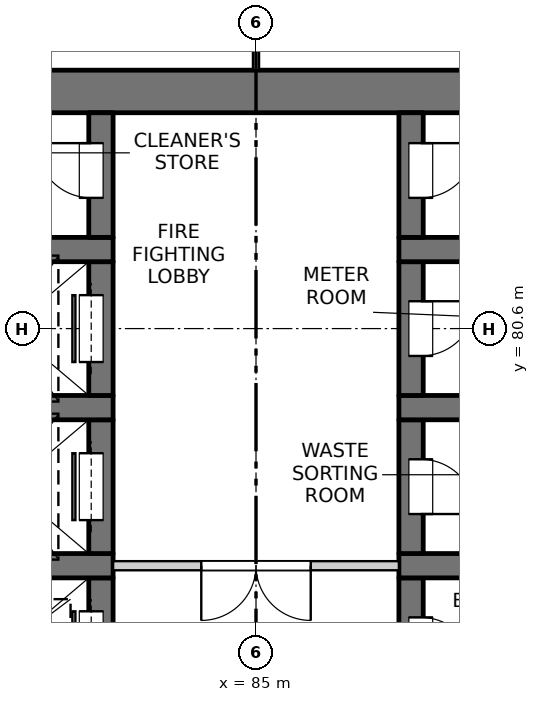
"""IFC4 building model, lengths in metres.
Left out: names, types, materials, properties, quantities, classifications, styles, units other than length and angle.
Written with IfcOpenShell. Run it as: python <this file> out.ifc"""

import sys

from ifc_helpers import new_model, si_unit, direction, frame, frame_2d, origin, place, context, subcontext, project, spatial, rectangle, extrude, element, fill, save


model = new_model("IFC4")
c1 = context("Model", 3, precision=1e-05, world=origin(), true_north=direction((0.0, 1.0)))
c2 = subcontext(c1, "Body", "Model", "MODEL_VIEW")
j1 = project(units=[si_unit("LENGTHUNIT", "METRE"), si_unit("PLANEANGLEUNIT", "RADIAN")], contexts=[c1])
p1 = place(None, origin())
s1 = spatial("IfcSite", under=j1, at=p1, CompositionType="ELEMENT")
p2 = place(p1, origin())
s2 = spatial("IfcBuilding", under=s1, at=p2, CompositionType="ELEMENT")
p3 = place(p2, frame((0.0, 0.0, 39.9)))
s3 = spatial("IfcBuildingStorey", under=s2, at=p3, CompositionType="ELEMENT", Elevation=39.9)
p4 = place(p3, frame((75.6, 84.5, -0.25), z_axis=(0.0, 0.0, 1.0), x_axis=(1.0, 0.0, 0.0)))
e1 = element("IfcWall", 1, at=p4, inside=s3, PredefinedType="SOLIDWALL", context=c2, shape_type="SweptSolid", body=[
    extrude(rectangle(XDim=18.8, YDim=0.7, at=frame_2d((9.4, 0.0))), origin(), (0.0, 0.0, 1.0), 3.4),
])
p5 = place(p3, frame((82.45, 74.3, -0.25), z_axis=(0.0, 0.0, 1.0), x_axis=(0.0, 1.0, 0.0)))
e2 = element("IfcWall", 2, at=p5, inside=s3, PredefinedType="SOLIDWALL", context=c2, shape_type="SweptSolid", body=[
    extrude(rectangle(XDim=2.2, YDim=0.4, at=frame_2d((1.1, 0.0))), origin(), (0.0, 0.0, 1.0), 3.4),
])
p6 = place(p5, frame((0.55, 0.0, 0.25)))
e3 = element("IfcOpeningElement", 3, at=p6, cuts=e2, PredefinedType="OPENING", context=c2, shape_type="SweptSolid", body=[
    extrude(rectangle(XDim=1.1, YDim=2.1, at=frame_2d((0.55, 1.05))), frame((0.0, 0.21, 0.0), z_axis=(0.0, -1.0, 0.0), x_axis=(1.0, 0.0, 0.0)), (0.0, 0.0, 1.0), 0.42),
])
p7 = place(p3, frame((79.65, 76.7, -0.25), z_axis=(0.0, 0.0, 1.0), x_axis=(1.0, 0.0, 0.0)))
e4 = element("IfcWall", 4, at=p7, inside=s3, PredefinedType="SOLIDWALL", context=c2, shape_type="SweptSolid", body=[
    extrude(rectangle(XDim=3.0, YDim=0.4, at=frame_2d((1.5, 0.0))), origin(), (0.0, 0.0, 1.0), 3.4),
])
p8 = place(p3, frame((82.45, 76.9, -0.25), z_axis=(0.0, 0.0, 1.0), x_axis=(0.0, 1.0, 0.0)))
e5 = element("IfcWall", 5, at=p8, inside=s3, PredefinedType="SOLIDWALL", context=c2, shape_type="SweptSolid", body=[
    extrude(rectangle(XDim=2.2, YDim=0.4, at=frame_2d((1.1, 0.0))), origin(), (0.0, 0.0, 1.0), 3.4),
])
p9 = place(p8, frame((0.55, 0.0, 0.25)))
e6 = element("IfcOpeningElement", 6, at=p9, cuts=e5, PredefinedType="OPENING", context=c2, shape_type="SweptSolid", body=[
    extrude(rectangle(XDim=1.1, YDim=2.1, at=frame_2d((0.55, 1.05))), frame((0.0, 0.21, 0.0), z_axis=(0.0, -1.0, 0.0), x_axis=(1.0, 0.0, 0.0)), (0.0, 0.0, 1.0), 0.42),
])
p10 = place(p3, frame((79.65, 79.3, -0.25), z_axis=(0.0, 0.0, 1.0), x_axis=(1.0, 0.0, 0.0)))
e7 = element("IfcWall", 7, at=p10, inside=s3, PredefinedType="SOLIDWALL", context=c2, shape_type="SweptSolid", body=[
    extrude(rectangle(XDim=3.0, YDim=0.4, at=frame_2d((1.5, 0.0))), origin(), (0.0, 0.0, 1.0), 3.4),
])
p11 = place(p3, frame((82.45, 79.5, -0.25), z_axis=(0.0, 0.0, 1.0), x_axis=(0.0, 1.0, 0.0)))
e8 = element("IfcWall", 8, at=p11, inside=s3, PredefinedType="SOLIDWALL", context=c2, shape_type="SweptSolid", body=[
    extrude(rectangle(XDim=2.2, YDim=0.4, at=frame_2d((1.1, 0.0))), origin(), (0.0, 0.0, 1.0), 3.4),
])
p12 = place(p11, frame((0.55, 0.0, 0.25)))
e9 = element("IfcOpeningElement", 9, at=p12, cuts=e8, PredefinedType="OPENING", context=c2, shape_type="SweptSolid", body=[
    extrude(rectangle(XDim=1.1, YDim=2.1, at=frame_2d((0.55, 1.05))), frame((0.0, 0.21, 0.0), z_axis=(0.0, -1.0, 0.0), x_axis=(1.0, 0.0, 0.0)), (0.0, 0.0, 1.0), 0.42),
])
p13 = place(p3, frame((79.65, 81.9, -0.25), z_axis=(0.0, 0.0, 1.0), x_axis=(1.0, 0.0, 0.0)))
e10 = element("IfcWall", 10, at=p13, inside=s3, PredefinedType="SOLIDWALL", context=c2, shape_type="SweptSolid", body=[
    extrude(rectangle(XDim=3.0, YDim=0.4, at=frame_2d((1.5, 0.0))), origin(), (0.0, 0.0, 1.0), 3.4),
])
p14 = place(p3, frame((82.45, 82.1, -0.25), z_axis=(0.0, 0.0, 1.0), x_axis=(0.0, 1.0, 0.0)))
e11 = element("IfcWall", 11, at=p14, inside=s3, PredefinedType="SOLIDWALL", context=c2, shape_type="SweptSolid", body=[
    extrude(rectangle(XDim=2.05, YDim=0.4, at=frame_2d((1.025, 0.0))), origin(), (0.0, 0.0, 1.0), 3.4),
])
p15 = place(p14, frame((0.65, 0.0, 0.25)))
e12 = element("IfcOpeningElement", 12, at=p15, cuts=e11, PredefinedType="OPENING", context=c2, shape_type="SweptSolid", body=[
    extrude(rectangle(XDim=0.9, YDim=2.1, at=frame_2d((0.45, 1.05))), frame((0.0, 0.21, 0.0), z_axis=(0.0, -1.0, 0.0), x_axis=(1.0, 0.0, 0.0)), (0.0, 0.0, 1.0), 0.42),
])
p16 = place(p3, frame((87.55, 74.3, -0.25), z_axis=(0.0, 0.0, 1.0), x_axis=(0.0, 1.0, 0.0)))
e13 = element("IfcWall", 13, at=p16, inside=s3, PredefinedType="SOLIDWALL", context=c2, shape_type="SweptSolid", body=[
    extrude(rectangle(XDim=2.2, YDim=0.4, at=frame_2d((1.1, 0.0))), origin(), (0.0, 0.0, 1.0), 3.4),
])
p17 = place(p16, frame((0.65, 0.0, 0.25)))
e14 = element("IfcOpeningElement", 14, at=p17, cuts=e13, PredefinedType="OPENING", context=c2, shape_type="SweptSolid", body=[
    extrude(rectangle(XDim=0.9, YDim=2.1, at=frame_2d((0.45, 1.05))), frame((0.0, 0.21, 0.0), z_axis=(0.0, -1.0, 0.0), x_axis=(1.0, 0.0, 0.0)), (0.0, 0.0, 1.0), 0.42),
])
p18 = place(p3, frame((87.35, 76.7, -0.25), z_axis=(0.0, 0.0, 1.0), x_axis=(1.0, 0.0, 0.0)))
e15 = element("IfcWall", 15, at=p18, inside=s3, PredefinedType="SOLIDWALL", context=c2, shape_type="SweptSolid", body=[
    extrude(rectangle(XDim=3.0, YDim=0.4, at=frame_2d((1.5, 0.0))), origin(), (0.0, 0.0, 1.0), 3.4),
])
p19 = place(p3, frame((87.55, 76.9, -0.25), z_axis=(0.0, 0.0, 1.0), x_axis=(0.0, 1.0, 0.0)))
e16 = element("IfcWall", 16, at=p19, inside=s3, PredefinedType="SOLIDWALL", context=c2, shape_type="SweptSolid", body=[
    extrude(rectangle(XDim=2.2, YDim=0.4, at=frame_2d((1.1, 0.0))), origin(), (0.0, 0.0, 1.0), 3.4),
])
p20 = place(p19, frame((0.65, 0.0, 0.25)))
e17 = element("IfcOpeningElement", 17, at=p20, cuts=e16, PredefinedType="OPENING", context=c2, shape_type="SweptSolid", body=[
    extrude(rectangle(XDim=0.9, YDim=2.1, at=frame_2d((0.45, 1.05))), frame((0.0, 0.21, 0.0), z_axis=(0.0, -1.0, 0.0), x_axis=(1.0, 0.0, 0.0)), (0.0, 0.0, 1.0), 0.42),
])
p21 = place(p3, frame((87.35, 79.3, -0.25), z_axis=(0.0, 0.0, 1.0), x_axis=(1.0, 0.0, 0.0)))
e18 = element("IfcWall", 18, at=p21, inside=s3, PredefinedType="SOLIDWALL", context=c2, shape_type="SweptSolid", body=[
    extrude(rectangle(XDim=3.0, YDim=0.4, at=frame_2d((1.5, 0.0))), origin(), (0.0, 0.0, 1.0), 3.4),
])
p22 = place(p3, frame((87.55, 79.5, -0.25), z_axis=(0.0, 0.0, 1.0), x_axis=(0.0, 1.0, 0.0)))
e19 = element("IfcWall", 19, at=p22, inside=s3, PredefinedType="SOLIDWALL", context=c2, shape_type="SweptSolid", body=[
    extrude(rectangle(XDim=2.2, YDim=0.4, at=frame_2d((1.1, 0.0))), origin(), (0.0, 0.0, 1.0), 3.4),
])
p23 = place(p22, frame((0.65, 0.0, 0.25)))
e20 = element("IfcOpeningElement", 20, at=p23, cuts=e19, PredefinedType="OPENING", context=c2, shape_type="SweptSolid", body=[
    extrude(rectangle(XDim=0.9, YDim=2.1, at=frame_2d((0.45, 1.05))), frame((0.0, 0.21, 0.0), z_axis=(0.0, -1.0, 0.0), x_axis=(1.0, 0.0, 0.0)), (0.0, 0.0, 1.0), 0.42),
])
p24 = place(p3, frame((87.35, 81.9, -0.25), z_axis=(0.0, 0.0, 1.0), x_axis=(1.0, 0.0, 0.0)))
e21 = element("IfcWall", 21, at=p24, inside=s3, PredefinedType="SOLIDWALL", context=c2, shape_type="SweptSolid", body=[
    extrude(rectangle(XDim=3.0, YDim=0.4, at=frame_2d((1.5, 0.0))), origin(), (0.0, 0.0, 1.0), 3.4),
])
p25 = place(p3, frame((87.55, 82.1, -0.25), z_axis=(0.0, 0.0, 1.0), x_axis=(0.0, 1.0, 0.0)))
e22 = element("IfcWall", 22, at=p25, inside=s3, PredefinedType="SOLIDWALL", context=c2, shape_type="SweptSolid", body=[
    extrude(rectangle(XDim=2.05, YDim=0.4, at=frame_2d((1.025, 0.0))), origin(), (0.0, 0.0, 1.0), 3.4),
])
p26 = place(p25, frame((0.65, 0.0, 0.25)))
e23 = element("IfcOpeningElement", 23, at=p26, cuts=e22, PredefinedType="OPENING", context=c2, shape_type="SweptSolid", body=[
    extrude(rectangle(XDim=0.9, YDim=2.1, at=frame_2d((0.45, 1.05))), frame((0.0, 0.21, 0.0), z_axis=(0.0, -1.0, 0.0), x_axis=(1.0, 0.0, 0.0)), (0.0, 0.0, 1.0), 0.42),
])
p27 = place(p3, frame((82.65, 76.7, 0.0), z_axis=(0.0, 0.0, 1.0), x_axis=(1.0, 0.0, 0.0)))
e24 = element("IfcWall", 24, at=p27, inside=s3, PredefinedType="PARTITIONING", context=c2, shape_type="SweptSolid", body=[
    extrude(rectangle(XDim=4.7, YDim=0.15, at=frame_2d((2.35, 0.0))), origin(), (0.0, 0.0, 1.0), 3.15),
])
p28 = place(p27, frame((1.45, 0.0, 0.0)))
e25 = element("IfcOpeningElement", 25, at=p28, cuts=e24, PredefinedType="OPENING", context=c2, shape_type="SweptSolid", body=[
    extrude(rectangle(XDim=1.8, YDim=2.1, at=frame_2d((0.9, 1.05))), frame((0.0, 0.085, 0.0), z_axis=(0.0, -1.0, 0.0), x_axis=(1.0, 0.0, 0.0)), (0.0, 0.0, 1.0), 0.17),
])
p29 = place(p3, frame((85.0, 84.85, 0.0), z_axis=(0.0, 0.0, 1.0), x_axis=(0.0, 1.0, 0.0)))
e26 = element("IfcWall", 26, at=p29, inside=s3, PredefinedType="PARTITIONING", context=c2, shape_type="SweptSolid", body=[
    extrude(rectangle(XDim=3.25, YDim=0.1, at=frame_2d((1.625, 0.0))), origin(), (0.0, 0.0, 1.0), 3.15),
])
p30 = place(p29, frame((1.15, 0.0, 0.0)))
e27 = element("IfcOpeningElement", 27, at=p30, cuts=e26, PredefinedType="OPENING", context=c2, shape_type="SweptSolid", body=[
    extrude(rectangle(XDim=0.9, YDim=2.1, at=frame_2d((0.45, 1.05))), frame((0.0, 0.06, 0.0), z_axis=(0.0, -1.0, 0.0), x_axis=(1.0, 0.0, 0.0)), (0.0, 0.0, 1.0), 0.12),
])
p31 = place(p6, origin())
e28 = element("IfcDoor", 28, at=p31, inside=s3, OperationType="SLIDING_TO_LEFT", PredefinedType="DOOR", context=c2, shape_type="SweptSolid", body=[
    extrude(rectangle(XDim=1.1, YDim=2.1, at=frame_2d((0.55, 1.05))), frame((0.0, 0.185, 0.0), z_axis=(0.0, -1.0, 0.0), x_axis=(1.0, 0.0, 0.0)), (0.0, 0.0, 1.0), 0.05),
])
fill(e3, e28)
p32 = place(p17, origin())
e29 = element("IfcDoor", 29, at=p32, inside=s3, OperationType="SINGLE_SWING_RIGHT", PredefinedType="DOOR", context=c2, shape_type="SweptSolid", body=[
    extrude(rectangle(XDim=0.9, YDim=2.1, at=frame_2d((0.45, 1.05))), frame((0.0, -0.135, 0.0), z_axis=(0.0, -1.0, 0.0), x_axis=(1.0, 0.0, 0.0)), (0.0, 0.0, 1.0), 0.05),
])
fill(e14, e29)
p33 = place(p28, origin())
e30 = element("IfcDoor", 30, at=p33, inside=s3, OperationType="DOUBLE_DOOR_SINGLE_SWING", PredefinedType="DOOR", context=c2, shape_type="SweptSolid", body=[
    extrude(rectangle(XDim=1.8, YDim=2.1, at=frame_2d((0.9, 1.05))), frame((0.0, 0.025, 0.0), z_axis=(0.0, -1.0, 0.0), x_axis=(1.0, 0.0, 0.0)), (0.0, 0.0, 1.0), 0.05),
])
fill(e25, e30)
p34 = place(p9, origin())
e31 = element("IfcDoor", 31, at=p34, inside=s3, OperationType="SLIDING_TO_LEFT", PredefinedType="DOOR", context=c2, shape_type="SweptSolid", body=[
    extrude(rectangle(XDim=1.1, YDim=2.1, at=frame_2d((0.55, 1.05))), frame((0.0, 0.185, 0.0), z_axis=(0.0, -1.0, 0.0), x_axis=(1.0, 0.0, 0.0)), (0.0, 0.0, 1.0), 0.05),
])
fill(e6, e31)
p35 = place(p20, origin())
e32 = element("IfcDoor", 32, at=p35, inside=s3, OperationType="SINGLE_SWING_RIGHT", PredefinedType="DOOR", context=c2, shape_type="SweptSolid", body=[
    extrude(rectangle(XDim=0.9, YDim=2.1, at=frame_2d((0.45, 1.05))), frame((0.0, -0.135, 0.0), z_axis=(0.0, -1.0, 0.0), x_axis=(1.0, 0.0, 0.0)), (0.0, 0.0, 1.0), 0.05),
])
fill(e17, e32)
p36 = place(p12, origin())
e33 = element("IfcDoor", 33, at=p36, inside=s3, OperationType="SLIDING_TO_LEFT", PredefinedType="DOOR", context=c2, shape_type="SweptSolid", body=[
    extrude(rectangle(XDim=1.1, YDim=2.1, at=frame_2d((0.55, 1.05))), frame((0.0, 0.185, 0.0), z_axis=(0.0, -1.0, 0.0), x_axis=(1.0, 0.0, 0.0)), (0.0, 0.0, 1.0), 0.05),
])
fill(e9, e33)
p37 = place(p23, origin())
e34 = element("IfcDoor", 34, at=p37, inside=s3, OperationType="SINGLE_SWING_LEFT", PredefinedType="DOOR", context=c2, shape_type="SweptSolid", body=[
    extrude(rectangle(XDim=0.9, YDim=2.1, at=frame_2d((0.45, 1.05))), frame((0.0, -0.135, 0.0), z_axis=(0.0, -1.0, 0.0), x_axis=(1.0, 0.0, 0.0)), (0.0, 0.0, 1.0), 0.05),
])
fill(e20, e34)
p38 = place(p15, origin())
e35 = element("IfcDoor", 35, at=p38, inside=s3, OperationType="SINGLE_SWING_RIGHT", PredefinedType="DOOR", context=c2, shape_type="SweptSolid", body=[
    extrude(rectangle(XDim=0.9, YDim=2.1, at=frame_2d((0.45, 1.05))), frame((0.0, 0.185, 0.0), z_axis=(0.0, -1.0, 0.0), x_axis=(1.0, 0.0, 0.0)), (0.0, 0.0, 1.0), 0.05),
])
fill(e12, e35)
p39 = place(p26, origin())
e36 = element("IfcDoor", 36, at=p39, inside=s3, OperationType="SINGLE_SWING_LEFT", PredefinedType="DOOR", context=c2, shape_type="SweptSolid", body=[
    extrude(rectangle(XDim=0.9, YDim=2.1, at=frame_2d((0.45, 1.05))), frame((0.0, -0.135, 0.0), z_axis=(0.0, -1.0, 0.0), x_axis=(1.0, 0.0, 0.0)), (0.0, 0.0, 1.0), 0.05),
])
fill(e23, e36)
save(model, sys.argv[1])
